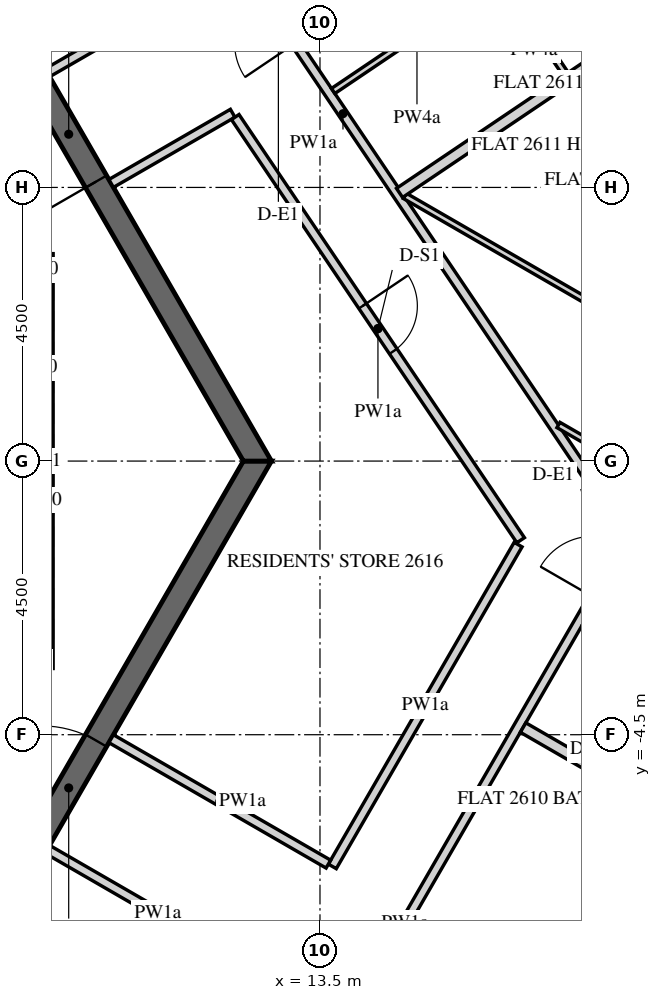
"""IFC4 building model, lengths in metres.
Left out: names, types, materials, properties, quantities, classifications, styles, units other than length and angle.
Written with IfcOpenShell. Run it as: python <this file> out.ifc"""

import sys

from ifc_helpers import new_model, si_unit, direction, frame, frame_2d, origin, place, context, subcontext, project, spatial, polyline, rectangle, outline, extrude, element, fill, save


model = new_model("IFC4")
c1 = context("Model", 3, precision=1e-05, world=origin(), true_north=direction((0.0, 1.0)))
c2 = subcontext(c1, "Body", "Model", "MODEL_VIEW")
j1 = project(units=[si_unit("LENGTHUNIT", "METRE"), si_unit("PLANEANGLEUNIT", "RADIAN")], contexts=[c1])
p1 = place(None, origin())
s1 = spatial("IfcSite", under=j1, at=p1, CompositionType="ELEMENT")
p2 = place(p1, origin())
s2 = spatial("IfcBuilding", under=s1, at=p2, CompositionType="ELEMENT")
p3 = place(p2, frame((0.0, 0.0, 326.4)))
s3 = spatial("IfcBuildingStorey", under=s2, at=p3, CompositionType="ELEMENT", Elevation=326.4)
p4 = place(p3, frame((16.451, -23.005, -0.15), z_axis=(0.0, 0.0, 1.0), x_axis=(0.500003737743, 0.866023245787, 0.0)))
e1 = element("IfcWall", 1, at=p4, inside=s3, PredefinedType="SOLIDWALL", context=c2, shape_type="SweptSolid", body=[
    extrude(outline(polyline([(-0.021, -0.25), (25.468, -0.25), (25.421, 0.25), (0.021, 0.25), (-0.021, -0.25)])), origin(), (0.0, 0.0, 1.0), 3.9),
])
p5 = place(p4, frame((2.522, 0.0, 0.75)))
e2 = element("IfcOpeningElement", 2, at=p5, cuts=e1, PredefinedType="OPENING", context=c2, shape_type="SweptSolid", body=[
    extrude(rectangle(XDim=2.4, YDim=2.7, at=frame_2d((1.2, 1.35))), frame((0.0, 0.26, 0.0), z_axis=(0.0, -1.0, 0.0), x_axis=(1.0, 0.0, 0.0)), (0.0, 0.0, 1.0), 0.52),
])
p6 = place(p4, frame((6.122, 0.0, 0.75)))
e3 = element("IfcOpeningElement", 3, at=p6, cuts=e1, PredefinedType="OPENING", context=c2, shape_type="SweptSolid", body=[
    extrude(rectangle(XDim=2.4, YDim=2.7, at=frame_2d((1.2, 1.35))), frame((0.0, 0.26, 0.0), z_axis=(0.0, -1.0, 0.0), x_axis=(1.0, 0.0, 0.0)), (0.0, 0.0, 1.0), 0.52),
])
p7 = place(p4, frame((9.722, 0.0, 0.75)))
e4 = element("IfcOpeningElement", 4, at=p7, cuts=e1, PredefinedType="OPENING", context=c2, shape_type="SweptSolid", body=[
    extrude(rectangle(XDim=2.4, YDim=2.7, at=frame_2d((1.2, 1.35))), frame((0.0, 0.26, 0.0), z_axis=(0.0, -1.0, 0.0), x_axis=(1.0, 0.0, 0.0)), (0.0, 0.0, 1.0), 0.52),
])
p8 = place(p4, frame((13.323, 0.0, 0.75)))
e5 = element("IfcOpeningElement", 5, at=p8, cuts=e1, PredefinedType="OPENING", context=c2, shape_type="SweptSolid", body=[
    extrude(rectangle(XDim=2.4, YDim=2.7, at=frame_2d((1.2, 1.35))), frame((0.0, 0.26, 0.0), z_axis=(0.0, -1.0, 0.0), x_axis=(1.0, 0.0, 0.0)), (0.0, 0.0, 1.0), 0.52),
])
p9 = place(p4, frame((16.922, 0.0, 0.75)))
e6 = element("IfcOpeningElement", 6, at=p9, cuts=e1, PredefinedType="OPENING", context=c2, shape_type="SweptSolid", body=[
    extrude(rectangle(XDim=2.4, YDim=2.7, at=frame_2d((1.2, 1.35))), frame((0.0, 0.26, 0.0), z_axis=(0.0, -1.0, 0.0), x_axis=(1.0, 0.0, 0.0)), (0.0, 0.0, 1.0), 0.52),
])
p10 = place(p4, frame((20.522, 0.0, 0.75)))
e7 = element("IfcOpeningElement", 7, at=p10, cuts=e1, PredefinedType="OPENING", context=c2, shape_type="SweptSolid", body=[
    extrude(rectangle(XDim=2.4, YDim=2.7, at=frame_2d((1.2, 1.35))), frame((0.0, 0.26, 0.0), z_axis=(0.0, -1.0, 0.0), x_axis=(1.0, 0.0, 0.0)), (0.0, 0.0, 1.0), 0.52),
])
p11 = place(p3, frame((26.706, 2.879, -0.15), z_axis=(0.0, 0.0, 1.0), x_axis=(-0.559197891507, 0.829034208061, 0.0)))
e8 = element("IfcWall", 8, at=p11, inside=s3, PredefinedType="SOLIDWALL", context=c2, shape_type="SweptSolid", body=[
    extrude(outline(polyline([(0.25, -0.25), (22.795, -0.25), (23.295, 0.25), (-0.25, 0.25), (0.25, -0.25)])), origin(), (0.0, 0.0, 1.0), 3.9),
])
p12 = place(p11, frame((1.323, 0.0, 1.05)))
e9 = element("IfcOpeningElement", 9, at=p12, cuts=e8, PredefinedType="OPENING", context=c2, shape_type="SweptSolid", body=[
    extrude(rectangle(XDim=0.9, YDim=1.5, at=frame_2d((0.45, 0.75))), frame((0.0, 0.26, 0.0), z_axis=(0.0, -1.0, 0.0), x_axis=(1.0, 0.0, 0.0)), (0.0, 0.0, 1.0), 0.52),
])
p13 = place(p11, frame((2.522, 0.0, 0.15)))
e10 = element("IfcOpeningElement", 10, at=p13, cuts=e8, PredefinedType="OPENING", context=c2, shape_type="SweptSolid", body=[
    extrude(rectangle(XDim=1.2, YDim=2.4, at=frame_2d((0.6, 1.2))), frame((0.0, 0.26, 0.0), z_axis=(0.0, -1.0, 0.0), x_axis=(1.0, 0.0, 0.0)), (0.0, 0.0, 1.0), 0.52),
])
p14 = place(p11, frame((4.922, 0.0, 1.05)))
e11 = element("IfcOpeningElement", 11, at=p14, cuts=e8, PredefinedType="OPENING", context=c2, shape_type="SweptSolid", body=[
    extrude(rectangle(XDim=0.9, YDim=1.5, at=frame_2d((0.45, 0.75))), frame((0.0, 0.26, 0.0), z_axis=(0.0, -1.0, 0.0), x_axis=(1.0, 0.0, 0.0)), (0.0, 0.0, 1.0), 0.52),
])
p15 = place(p11, frame((6.122, 0.0, 0.15)))
e12 = element("IfcOpeningElement", 12, at=p15, cuts=e8, PredefinedType="OPENING", context=c2, shape_type="SweptSolid", body=[
    extrude(rectangle(XDim=1.2, YDim=2.4, at=frame_2d((0.6, 1.2))), frame((0.0, 0.26, 0.0), z_axis=(0.0, -1.0, 0.0), x_axis=(1.0, 0.0, 0.0)), (0.0, 0.0, 1.0), 0.52),
])
p16 = place(p11, frame((8.522, 0.0, 1.05)))
e13 = element("IfcOpeningElement", 13, at=p16, cuts=e8, PredefinedType="OPENING", context=c2, shape_type="SweptSolid", body=[
    extrude(rectangle(XDim=0.9, YDim=1.5, at=frame_2d((0.45, 0.75))), frame((0.0, 0.26, 0.0), z_axis=(0.0, -1.0, 0.0), x_axis=(1.0, 0.0, 0.0)), (0.0, 0.0, 1.0), 0.52),
])
p17 = place(p11, frame((9.722, 0.0, 0.15)))
e14 = element("IfcOpeningElement", 14, at=p17, cuts=e8, PredefinedType="OPENING", context=c2, shape_type="SweptSolid", body=[
    extrude(rectangle(XDim=1.2, YDim=2.4, at=frame_2d((0.6, 1.2))), frame((0.0, 0.26, 0.0), z_axis=(0.0, -1.0, 0.0), x_axis=(1.0, 0.0, 0.0)), (0.0, 0.0, 1.0), 0.52),
])
p18 = place(p11, frame((12.122, 0.0, 1.05)))
e15 = element("IfcOpeningElement", 15, at=p18, cuts=e8, PredefinedType="OPENING", context=c2, shape_type="SweptSolid", body=[
    extrude(rectangle(XDim=0.9, YDim=1.5, at=frame_2d((0.45, 0.75))), frame((0.0, 0.26, 0.0), z_axis=(0.0, -1.0, 0.0), x_axis=(1.0, 0.0, 0.0)), (0.0, 0.0, 1.0), 0.52),
])
p19 = place(p11, frame((13.323, 0.0, 0.15)))
e16 = element("IfcOpeningElement", 16, at=p19, cuts=e8, PredefinedType="OPENING", context=c2, shape_type="SweptSolid", body=[
    extrude(rectangle(XDim=1.2, YDim=2.4, at=frame_2d((0.6, 1.2))), frame((0.0, 0.26, 0.0), z_axis=(0.0, -1.0, 0.0), x_axis=(1.0, 0.0, 0.0)), (0.0, 0.0, 1.0), 0.52),
])
p20 = place(p11, frame((15.722, 0.0, 1.05)))
e17 = element("IfcOpeningElement", 17, at=p20, cuts=e8, PredefinedType="OPENING", context=c2, shape_type="SweptSolid", body=[
    extrude(rectangle(XDim=0.9, YDim=1.5, at=frame_2d((0.45, 0.75))), frame((0.0, 0.26, 0.0), z_axis=(0.0, -1.0, 0.0), x_axis=(1.0, 0.0, 0.0)), (0.0, 0.0, 1.0), 0.52),
])
p21 = place(p11, frame((16.922, 0.0, 0.15)))
e18 = element("IfcOpeningElement", 18, at=p21, cuts=e8, PredefinedType="OPENING", context=c2, shape_type="SweptSolid", body=[
    extrude(rectangle(XDim=1.2, YDim=2.4, at=frame_2d((0.6, 1.2))), frame((0.0, 0.26, 0.0), z_axis=(0.0, -1.0, 0.0), x_axis=(1.0, 0.0, 0.0)), (0.0, 0.0, 1.0), 0.52),
])
p22 = place(p11, frame((19.323, 0.0, 1.05)))
e19 = element("IfcOpeningElement", 19, at=p22, cuts=e8, PredefinedType="OPENING", context=c2, shape_type="SweptSolid", body=[
    extrude(rectangle(XDim=0.9, YDim=1.5, at=frame_2d((0.45, 0.75))), frame((0.0, 0.26, 0.0), z_axis=(0.0, -1.0, 0.0), x_axis=(1.0, 0.0, 0.0)), (0.0, 0.0, 1.0), 0.52),
])
p23 = place(p11, frame((20.522, 0.0, 0.15)))
e20 = element("IfcOpeningElement", 20, at=p23, cuts=e8, PredefinedType="OPENING", context=c2, shape_type="SweptSolid", body=[
    extrude(rectangle(XDim=1.2, YDim=2.4, at=frame_2d((0.6, 1.2))), frame((0.0, 0.26, 0.0), z_axis=(0.0, -1.0, 0.0), x_axis=(1.0, 0.0, 0.0)), (0.0, 0.0, 1.0), 0.52),
])
p24 = place(p3, frame((6.235, -10.8, -0.15), z_axis=(0.0, 0.0, 1.0), x_axis=(0.499996419489, 0.866027470984, 0.0)))
e21 = element("IfcWall", 21, at=p24, inside=s3, PredefinedType="SHEAR", context=c2, shape_type="SweptSolid", body=[
    extrude(outline(polyline([(-0.115, -0.2), (12.586, -0.2), (12.355, 0.2), (0.115, 0.2), (-0.115, -0.2)])), origin(), (0.0, 0.0, 1.0), 3.9),
])
p25 = place(p24, frame((5.364, 0.0, 0.15)))
e22 = element("IfcOpeningElement", 22, at=p25, cuts=e21, PredefinedType="OPENING", context=c2, shape_type="SweptSolid", body=[
    extrude(rectangle(XDim=1.8, YDim=2.4, at=frame_2d((0.9, 1.2))), frame((0.0, 0.21, 0.0), z_axis=(0.0, -1.0, 0.0), x_axis=(1.0, 0.0, 0.0)), (0.0, 0.0, 1.0), 0.42),
])
p26 = place(p3, frame((12.471, 0.0, -0.15), z_axis=(0.0, 0.0, 1.0), x_axis=(-0.499996419489, 0.866027470984, 0.0)))
e23 = element("IfcWall", 23, at=p26, inside=s3, PredefinedType="SHEAR", context=c2, shape_type="SweptSolid", body=[
    extrude(outline(polyline([(-0.115, -0.2), (12.586, -0.2), (12.355, 0.2), (0.115, 0.2), (-0.115, -0.2)])), origin(), (0.0, 0.0, 1.0), 3.9),
])
p27 = place(p26, frame((5.306, 0.0, 0.15)))
e24 = element("IfcOpeningElement", 24, at=p27, cuts=e23, PredefinedType="OPENING", context=c2, shape_type="SweptSolid", body=[
    extrude(rectangle(XDim=1.8, YDim=2.4, at=frame_2d((0.9, 1.2))), frame((0.0, 0.21, 0.0), z_axis=(0.0, -1.0, 0.0), x_axis=(1.0, 0.0, 0.0)), (0.0, 0.0, 1.0), 0.42),
])
p28 = place(p3, frame((11.229, -13.951, 0.0), z_axis=(0.0, 0.0, 1.0), x_axis=(0.499997948852, 0.866026588012, 0.0)))
e25 = element("IfcWall", 25, at=p28, inside=s3, PredefinedType="PARTITIONING", context=c2, shape_type="SweptSolid", body=[
    extrude(rectangle(XDim=14.677, YDim=0.15, at=frame_2d((7.339, 0.0))), origin(), (0.0, 0.0, 1.0), 2.838),
])
p29 = place(p28, frame((0.4, 0.0, 0.0)))
e26 = element("IfcOpeningElement", 26, at=p29, cuts=e25, PredefinedType="OPENING", context=c2, shape_type="SweptSolid", body=[
    extrude(rectangle(XDim=1.0, YDim=2.1, at=frame_2d((0.5, 1.05))), frame((0.0, 0.085, 0.0), z_axis=(0.0, -1.0, 0.0), x_axis=(1.0, 0.0, 0.0)), (0.0, 0.0, 1.0), 0.17),
])
p30 = place(p28, frame((13.527, 0.0, 0.0)))
e27 = element("IfcOpeningElement", 27, at=p30, cuts=e25, PredefinedType="OPENING", context=c2, shape_type="SweptSolid", body=[
    extrude(rectangle(XDim=1.0, YDim=2.1, at=frame_2d((0.5, 1.05))), frame((0.0, 0.085, 0.0), z_axis=(0.0, -1.0, 0.0), x_axis=(1.0, 0.0, 0.0)), (0.0, 0.0, 1.0), 0.17),
])
p31 = place(p3, frame((18.521, -1.171, 0.0), z_axis=(0.0, 0.0, 1.0), x_axis=(-0.559191021435, 0.829038842001, 0.0)))
e28 = element("IfcWall", 28, at=p31, inside=s3, PredefinedType="PARTITIONING", context=c2, shape_type="SweptSolid", body=[
    extrude(rectangle(XDim=16.605, YDim=0.15, at=frame_2d((8.303, 0.0))), origin(), (0.0, 0.0, 1.0), 2.838),
])
p32 = place(p31, frame((9.703, 0.0, 0.0)))
e29 = element("IfcOpeningElement", 29, at=p32, cuts=e28, PredefinedType="OPENING", context=c2, shape_type="SweptSolid", body=[
    extrude(rectangle(XDim=1.0, YDim=2.1, at=frame_2d((0.5, 1.05))), frame((0.0, 0.085, 0.0), z_axis=(0.0, -1.0, 0.0), x_axis=(1.0, 0.0, 0.0)), (0.0, 0.0, 1.0), 0.17),
])
p33 = place(p3, frame((9.016, -6.384, 0.0), z_axis=(0.0, 0.0, 1.0), x_axis=(0.866023935413, -0.500002543286, 0.0)))
e30 = element("IfcWall", 30, at=p33, inside=s3, PredefinedType="PARTITIONING", context=c2, shape_type="SweptSolid", body=[
    extrude(rectangle(XDim=4.2, YDim=0.15, at=frame_2d((2.1, 0.0))), origin(), (0.0, 0.0, 1.0), 2.838),
])
p34 = place(p3, frame((10.066, 4.566, 0.0), z_axis=(0.0, 0.0, 1.0), x_axis=(0.866034075723, 0.499984979461, 0.0)))
e31 = element("IfcWall", 31, at=p34, inside=s3, PredefinedType="PARTITIONING", context=c2, shape_type="SweptSolid", body=[
    extrude(rectangle(XDim=2.308, YDim=0.15, at=frame_2d((1.154, 0.0))), origin(), (0.0, 0.0, 1.0), 2.838),
])
p35 = place(p3, frame((12.106, 5.657, 0.0), z_axis=(0.0, 0.0, 1.0), x_axis=(0.559202573837, -0.829031049728, 0.0)))
e32 = element("IfcWall", 32, at=p35, inside=s3, PredefinedType="PARTITIONING", context=c2, shape_type="SweptSolid", body=[
    extrude(rectangle(XDim=8.394, YDim=0.15, at=frame_2d((4.197, 0.0))), origin(), (0.0, 0.0, 1.0), 2.838),
])
p36 = place(p35, frame((3.747, 0.0, 0.0)))
e33 = element("IfcOpeningElement", 33, at=p36, cuts=e32, PredefinedType="OPENING", context=c2, shape_type="SweptSolid", body=[
    extrude(rectangle(XDim=0.9, YDim=2.1, at=frame_2d((0.45, 1.05))), frame((0.0, 0.085, 0.0), z_axis=(0.0, -1.0, 0.0), x_axis=(1.0, 0.0, 0.0)), (0.0, 0.0, 1.0), 0.17),
])
p37 = place(p3, frame((16.758, -1.374, 0.0), z_axis=(0.0, 0.0, 1.0), x_axis=(-0.499980689202, -0.866036552592, 0.0)))
e34 = element("IfcWall", 34, at=p37, inside=s3, PredefinedType="PARTITIONING", context=c2, shape_type="SweptSolid", body=[
    extrude(rectangle(XDim=6.111, YDim=0.15, at=frame_2d((3.055, 0.0))), origin(), (0.0, 0.0, 1.0), 2.838),
])
p38 = place(p3, frame((13.638, -6.628, 0.0), z_axis=(0.0, 0.0, 1.0), x_axis=(-0.866034795751, 0.499983732284, 0.0)))
e35 = element("IfcWall", 35, at=p38, inside=s3, PredefinedType="PARTITIONING", context=c2, shape_type="SweptSolid", body=[
    extrude(rectangle(XDim=4.125, YDim=0.15, at=frame_2d((2.062, 0.0))), origin(), (0.0, 0.0, 1.0), 2.838),
])
p39 = place(p3, frame((10.822, 7.427, 0.0), z_axis=(0.0, 0.0, 1.0), x_axis=(-0.866016009309, -0.500016271356, 0.0)))
e36 = element("IfcWall", 36, at=p39, inside=s3, PredefinedType="PARTITIONING", context=c2, shape_type="SweptSolid", body=[
    extrude(rectangle(XDim=2.086, YDim=0.15, at=frame_2d((1.043, 0.0))), origin(), (0.0, 0.0, 1.0), 2.838),
])
p40 = place(p3, frame((24.396, -8.745, 0.0), z_axis=(0.0, 0.0, 1.0), x_axis=(-0.866018297078, 0.500012308975, 0.0)))
e37 = element("IfcWall", 37, at=p40, inside=s3, PredefinedType="PARTITIONING", context=c2, shape_type="SweptSolid", body=[
    extrude(rectangle(XDim=8.725, YDim=0.18, at=frame_2d((4.362, 0.0))), origin(), (0.0, 0.0, 1.0), 2.838),
])
p41 = place(p3, frame((14.896, 4.361, 0.0), z_axis=(0.0, 0.0, 1.0), x_axis=(0.866020874699, -0.500007844523, 0.0)))
e38 = element("IfcWall", 38, at=p41, inside=s3, PredefinedType="PARTITIONING", context=c2, shape_type="SweptSolid", body=[
    extrude(rectangle(XDim=9.38, YDim=0.1, at=frame_2d((4.69, 0.0))), origin(), (0.0, 0.0, 1.0), 2.838),
])
p42 = place(p3, frame((22.069, 9.307, 0.0), z_axis=(0.0, 0.0, 1.0), x_axis=(-0.829040270775, -0.559188903174, 0.0)))
e39 = element("IfcWall", 39, at=p42, inside=s3, PredefinedType="PARTITIONING", context=c2, shape_type="SweptSolid", body=[
    extrude(rectangle(XDim=8.758, YDim=0.18, at=frame_2d((4.379, 0.0))), origin(), (0.0, 0.0, 1.0), 2.838),
])
p43 = place(p3, frame((22.02, -2.061, 0.0), z_axis=(0.0, 0.0, 1.0), x_axis=(-0.866041630335, 0.499971893737, 0.0)))
e40 = element("IfcWall", 40, at=p43, inside=s3, PredefinedType="PARTITIONING", context=c2, shape_type="SweptSolid", body=[
    extrude(rectangle(XDim=5.309, YDim=0.1, at=frame_2d((2.655, 0.0))), origin(), (0.0, 0.0, 1.0), 2.838),
])
p44 = place(p43, frame((1.3, 0.0, 0.0)))
e41 = element("IfcOpeningElement", 41, at=p44, cuts=e40, PredefinedType="OPENING", context=c2, shape_type="SweptSolid", body=[
    extrude(rectangle(XDim=0.8, YDim=2.1, at=frame_2d((0.4, 1.05))), frame((0.0, 0.06, 0.0), z_axis=(0.0, -1.0, 0.0), x_axis=(1.0, 0.0, 0.0)), (0.0, 0.0, 1.0), 0.12),
])
p45 = place(p3, frame((13.717, 6.086, 0.0), z_axis=(0.0, 0.0, 1.0), x_axis=(0.829067379225, 0.559148710725, 0.0)))
e42 = element("IfcWall", 42, at=p45, inside=s3, PredefinedType="PARTITIONING", context=c2, shape_type="SweptSolid", body=[
    extrude(rectangle(XDim=3.325, YDim=0.1, at=frame_2d((1.663, 0.0))), origin(), (0.0, 0.0, 1.0), 2.838),
])
p46 = place(p45, frame((1.225, 0.0, 0.0)))
e43 = element("IfcOpeningElement", 43, at=p46, cuts=e42, PredefinedType="OPENING", context=c2, shape_type="SweptSolid", body=[
    extrude(rectangle(XDim=0.8, YDim=2.1, at=frame_2d((0.4, 1.05))), frame((0.0, 0.06, 0.0), z_axis=(0.0, -1.0, 0.0), x_axis=(1.0, 0.0, 0.0)), (0.0, 0.0, 1.0), 0.12),
])
p47 = place(p3, frame((17.541, 6.362, 0.0), z_axis=(0.0, 0.0, 1.0), x_axis=(-0.559110227504, 0.829093332201, 0.0)))
e44 = element("IfcWall", 44, at=p47, inside=s3, PredefinedType="PARTITIONING", context=c2, shape_type="SweptSolid", body=[
    extrude(rectangle(XDim=1.862, YDim=0.1, at=frame_2d((0.931, 0.0))), origin(), (0.0, 0.0, 1.0), 2.838),
])
p48 = place(p27, origin())
e45 = element("IfcDoor", 45, at=p48, inside=s3, OperationType="DOUBLE_DOOR_SINGLE_SWING", PredefinedType="DOOR", context=c2, shape_type="SweptSolid", body=[
    extrude(rectangle(XDim=1.8, YDim=2.4, at=frame_2d((0.9, 1.2))), frame((0.0, 0.025, 0.0), z_axis=(0.0, -1.0, 0.0), x_axis=(1.0, 0.0, 0.0)), (0.0, 0.0, 1.0), 0.05),
])
fill(e24, e45)
p49 = place(p25, origin())
e46 = element("IfcDoor", 46, at=p49, inside=s3, OperationType="DOUBLE_DOOR_SINGLE_SWING", PredefinedType="DOOR", context=c2, shape_type="SweptSolid", body=[
    extrude(rectangle(XDim=1.8, YDim=2.4, at=frame_2d((0.9, 1.2))), frame((0.0, 0.025, 0.0), z_axis=(0.0, -1.0, 0.0), x_axis=(1.0, 0.0, 0.0)), (0.0, 0.0, 1.0), 0.05),
])
fill(e22, e46)
p50 = place(p36, origin())
e47 = element("IfcDoor", 47, at=p50, inside=s3, OperationType="SINGLE_SWING_RIGHT", PredefinedType="DOOR", context=c2, shape_type="SweptSolid", body=[
    extrude(rectangle(XDim=0.9, YDim=2.1, at=frame_2d((0.45, 1.05))), frame((0.0, 0.025, 0.0), z_axis=(0.0, -1.0, 0.0), x_axis=(1.0, 0.0, 0.0)), (0.0, 0.0, 1.0), 0.05),
])
fill(e33, e47)
save(model, sys.argv[1])
